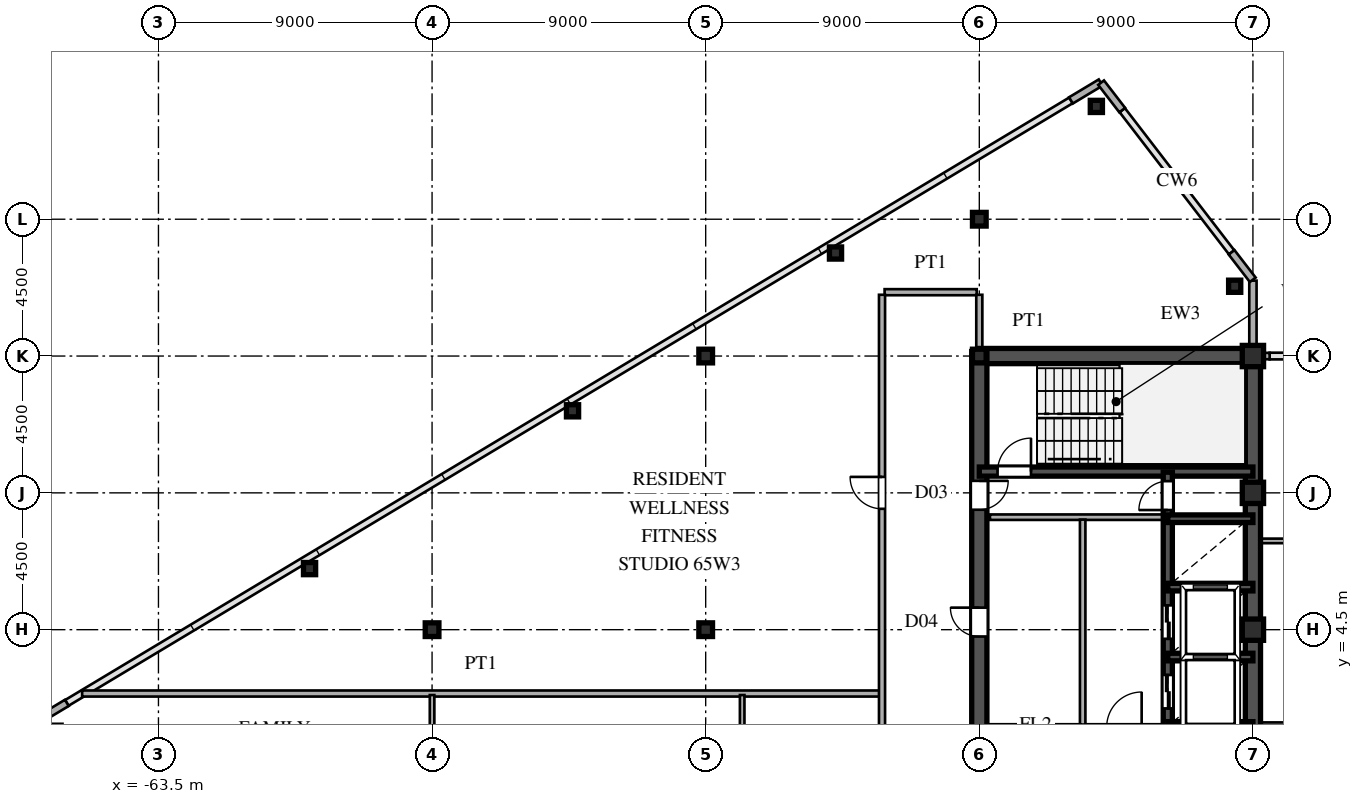
"""IFC4 building model, lengths in metres.
Left out: names, types, materials, properties, quantities, classifications, styles, units other than length and angle.
Written with IfcOpenShell. Run it as: python <this file> out.ifc"""

import sys

from ifc_helpers import new_model, si_unit, direction, frame, frame_2d, origin, origin_2d, place, context, subcontext, project, spatial, rectangle, hollow_rectangle, i_section, extrude, source, transform, mapped, element, fill, save


model = new_model("IFC4")
c1 = context("Model", 3, precision=1e-05, world=origin(), true_north=direction((0.0, 1.0)))
c2 = subcontext(c1, "Body", "Model", "MODEL_VIEW")
j1 = project(units=[si_unit("LENGTHUNIT", "METRE"), si_unit("PLANEANGLEUNIT", "RADIAN")], contexts=[c1])
p1 = place(None, origin())
s1 = spatial("IfcSite", under=j1, at=p1, CompositionType="ELEMENT")
p2 = place(p1, origin())
s2 = spatial("IfcBuilding", under=s1, at=p2, CompositionType="ELEMENT")
p3 = place(p2, frame((0.0, 0.0, 246.9)))
s3 = spatial("IfcBuildingStorey", under=s2, at=p3, CompositionType="ELEMENT", Elevation=246.9)
m1 = source(origin(), c2, "Body", "SweptSolid", [
    extrude(hollow_rectangle(XDim=0.7, YDim=0.7, WallThickness=0.03, at=origin_2d()), origin(), (0.0, 0.0, 1.0), 3.75),
])
for number, where, z_axis, x_axis in (
    (1, (-27.5, 4.5, 0.0), (0.0, 0.0, 1.0), (1.0, 0.0, 0.0)),
    (2, (-27.5, 9.0, 0.0), (0.0, 0.0, 1.0), (1.0, 0.0, 0.0)),
    (3, (-27.5, 13.5, 0.0), (0.0, 0.0, 1.0), (1.0, 0.0, 0.0)),
):
    element("IfcColumn", number, at=place(p3, frame(where, z_axis=z_axis, x_axis=x_axis)), inside=s3, PredefinedType="COLUMN", context=c2, shape_type="MappedRepresentation", body=[
        mapped(m1, transform((0.0, 0.0, 0.0), scale=1.0)),
    ])
m2 = source(origin(), c2, "Body", "SweptSolid", [
    extrude(i_section(OverallWidth=0.45, OverallDepth=0.45, WebThickness=0.016, FlangeThickness=0.025, at=origin_2d()), origin(), (0.0, 0.0, 1.0), 3.75),
])
for number, where, z_axis, x_axis in (
    (4, (-36.5, 13.5, 0.0), (0.0, 0.0, 1.0), (1.0, 0.0, 0.0)),
    (5, (-36.5, 18.0, 0.0), (0.0, 0.0, 1.0), (1.0, 0.0, 0.0)),
    (6, (-45.5, 4.5, 0.0), (0.0, 0.0, 1.0), (1.0, 0.0, 0.0)),
    (7, (-45.5, 13.5, 0.0), (0.0, 0.0, 1.0), (1.0, 0.0, 0.0)),
    (8, (-54.5, 4.5, 0.0), (0.0, 0.0, 1.0), (1.0, 0.0, 0.0)),
):
    element("IfcColumn", number, at=place(p3, frame(where, z_axis=z_axis, x_axis=x_axis)), inside=s3, PredefinedType="COLUMN", context=c2, shape_type="MappedRepresentation", body=[
        mapped(m2, transform((0.0, 0.0, 0.0), scale=1.0)),
    ])
m3 = source(origin(), c2, "Body", "SweptSolid", [
    extrude(hollow_rectangle(XDim=0.4, YDim=0.4, WallThickness=0.016, at=origin_2d()), origin(), (0.0, 0.0, 1.0), 3.75),
])
for number, where, z_axis, x_axis in (
    (9, (-28.1, 15.796, 0.0), (0.0, 0.0, 1.0), (1.0, 0.0, 0.0)),
    (10, (-32.65, 21.71, 0.0), (0.0, 0.0, 1.0), (1.0, 0.0, 0.0)),
    (11, (-41.23, 16.889, 0.0), (0.0, 0.0, 1.0), (1.0, 0.0, 0.0)),
    (12, (-49.88, 11.699, 0.0), (0.0, 0.0, 1.0), (1.0, 0.0, 0.0)),
    (13, (-58.53, 6.509, 0.0), (0.0, 0.0, 1.0), (1.0, 0.0, 0.0)),
):
    element("IfcColumn", number, at=place(p3, frame(where, z_axis=z_axis, x_axis=x_axis)), inside=s3, PredefinedType="COLUMN", context=c2, shape_type="MappedRepresentation", body=[
        mapped(m3, transform((0.0, 0.0, 0.0), scale=1.0)),
    ])
p4 = place(p3, frame((-27.5, 13.755, 0.0), z_axis=(0.0, 0.0, 1.0), x_axis=(0.0, 1.0, 0.0)))
e14 = element("IfcWall", 14, at=p4, inside=s3, PredefinedType="SOLIDWALL", context=c2, shape_type="SweptSolid", body=[
    extrude(rectangle(XDim=0.62, YDim=0.24, at=frame_2d((0.31, 0.0))), origin(), (0.0, 0.0, 1.0), 3.03),
])
p5 = place(p3, frame((-27.5, 14.375, 0.0), z_axis=(0.0, 0.0, 1.0), x_axis=(0.0, 1.0, 0.0)))
e15 = element("IfcWall", 15, at=p5, inside=s3, PredefinedType="SOLIDWALL", context=c2, shape_type="SweptSolid", body=[
    extrude(rectangle(XDim=1.605, YDim=0.24, at=frame_2d((0.803, 0.0))), origin(), (0.0, 0.0, 1.0), 3.53),
])
for number, where, z_axis, x_axis in (
    (16, (-27.506, 16.008, 0.0), (0.0, 0.0, 1.0), (-0.61, 0.793, 0.0)),
    (17, (-31.799, 21.588, 0.0), (0.0, 0.0, 1.0), (-0.61, 0.793, 0.0)),
    (18, (-32.509, 22.495, 0.0), (0.0, 0.0, 1.0), (-0.857, -0.515, 0.0)),
    (19, (-66.514, 2.092, 0.0), (0.0, 0.0, 1.0), (-0.857, -0.515, 0.0)),
):
    element("IfcWall", number, at=place(p3, frame(where, z_axis=z_axis, x_axis=x_axis)), inside=s3, PredefinedType="SOLIDWALL", context=c2, shape_type="SweptSolid", body=[
        extrude(rectangle(XDim=1.14, YDim=0.24, at=frame_2d((0.57, 0.0))), origin(), (0.0, 0.0, 1.0), 3.53),
    ])
p6 = place(p3, frame((-27.49, 13.5, 0.0), z_axis=(0.0, 0.0, 1.0), x_axis=(1.0, 0.0, 0.0)))
e20 = element("IfcWall", 20, at=p6, inside=s3, PredefinedType="SOLIDWALL", context=c2, shape_type="SweptSolid", body=[
    extrude(rectangle(XDim=0.54, YDim=0.21, at=frame_2d((0.27, 0.0))), origin(), (0.0, 0.0, 1.0), 3.03),
])
p7 = place(p3, frame((-27.5, 1.3, 0.0), z_axis=(0.0, 0.0, 1.0), x_axis=(0.0, 1.0, 0.0)))
e21 = element("IfcWall", 21, at=p7, inside=s3, PredefinedType="SHEAR", context=c2, shape_type="SweptSolid", body=[
    extrude(rectangle(XDim=12.2, YDim=0.5, at=frame_2d((6.1, 0.0))), origin(), (0.0, 0.0, 1.0), 3.53),
])
p8 = place(p3, frame((-36.5, 13.5, 0.0), z_axis=(0.0, 0.0, 1.0), x_axis=(1.0, 0.0, 0.0)))
e22 = element("IfcWall", 22, at=p8, inside=s3, PredefinedType="SHEAR", context=c2, shape_type="SweptSolid", body=[
    extrude(rectangle(XDim=9.0, YDim=0.5, at=frame_2d((4.5, 0.0))), origin(), (0.0, 0.0, 1.0), 3.53),
])
p9 = place(p3, frame((-36.5, 8.2, 0.0), z_axis=(0.0, 0.0, 1.0), x_axis=(0.0, 1.0, 0.0)))
e23 = element("IfcWall", 23, at=p9, inside=s3, PredefinedType="SHEAR", context=c2, shape_type="SweptSolid", body=[
    extrude(rectangle(XDim=5.45, YDim=0.5, at=frame_2d((2.725, 0.0))), origin(), (0.0, 0.0, 1.0), 3.53),
])
p10 = place(p9, frame((0.245, 0.0, 0.0)))
e24 = element("IfcOpeningElement", 24, at=p10, cuts=e23, PredefinedType="OPENING", context=c2, shape_type="SweptSolid", body=[
    extrude(rectangle(XDim=0.95, YDim=2.15, at=frame_2d((0.475, 1.075))), frame((0.0, 0.26, 0.0), z_axis=(0.0, -1.0, 0.0), x_axis=(1.0, 0.0, 0.0)), (0.0, 0.0, 1.0), 0.52),
])
p11 = place(p3, frame((-36.5, 1.3, 0.0), z_axis=(0.0, 0.0, 1.0), x_axis=(0.0, 1.0, 0.0)))
e25 = element("IfcWall", 25, at=p11, inside=s3, PredefinedType="SHEAR", context=c2, shape_type="SweptSolid", body=[
    extrude(rectangle(XDim=6.9, YDim=0.5, at=frame_2d((3.45, 0.0))), origin(), (0.0, 0.0, 1.0), 3.53),
])
p12 = place(p11, frame((2.975, 0.0, 0.0)))
e26 = element("IfcOpeningElement", 26, at=p12, cuts=e25, PredefinedType="OPENING", context=c2, shape_type="SweptSolid", body=[
    extrude(rectangle(XDim=0.95, YDim=2.15, at=frame_2d((0.475, 1.075))), frame((0.0, 0.26, 0.0), z_axis=(0.0, -1.0, 0.0), x_axis=(1.0, 0.0, 0.0)), (0.0, 0.0, 1.0), 0.52),
])
p13 = place(p3, frame((-36.5, 9.7, 0.0), z_axis=(0.0, 0.0, 1.0), x_axis=(1.0, 0.0, 0.0)))
e27 = element("IfcWall", 27, at=p13, inside=s3, PredefinedType="SHEAR", context=c2, shape_type="SweptSolid", body=[
    extrude(rectangle(XDim=9.0, YDim=0.3, at=frame_2d((4.5, 0.0))), origin(), (0.0, 0.0, 1.0), 3.53),
])
p14 = place(p13, frame((0.6, 0.0, 0.0)))
e28 = element("IfcOpeningElement", 28, at=p14, cuts=e27, PredefinedType="OPENING", context=c2, shape_type="SweptSolid", body=[
    extrude(rectangle(XDim=1.1, YDim=2.2, at=frame_2d((0.55, 1.1))), frame((0.0, 0.16, 0.0), z_axis=(0.0, -1.0, 0.0), x_axis=(1.0, 0.0, 0.0)), (0.0, 0.0, 1.0), 0.32),
])
for number, where, z_axis, x_axis in (
    (29, (-30.3, 1.35, 0.0), (0.0, 0.0, 1.0), (1.0, 0.0, 0.0)),
    (30, (-30.3, 3.6, 0.0), (0.0, 0.0, 1.0), (1.0, 0.0, 0.0)),
    (31, (-30.3, 5.9, 0.0), (0.0, 0.0, 1.0), (1.0, 0.0, 0.0)),
    (32, (-30.3, 8.15, 0.0), (0.0, 0.0, 1.0), (1.0, 0.0, 0.0)),
):
    element("IfcWall", number, at=place(p3, frame(where, z_axis=z_axis, x_axis=x_axis)), inside=s3, PredefinedType="SHEAR", context=c2, shape_type="SweptSolid", body=[
        extrude(rectangle(XDim=2.8, YDim=0.25, at=frame_2d((1.4, 0.0))), origin(), (0.0, 0.0, 1.0), 3.53),
    ])
p15 = place(p3, frame((-30.3, 1.32, 0.0), z_axis=(0.0, 0.0, 1.0), x_axis=(0.0, 1.0, 0.0)))
e33 = element("IfcWall", 33, at=p15, inside=s3, PredefinedType="SHEAR", context=c2, shape_type="SweptSolid", body=[
    extrude(rectangle(XDim=2.28, YDim=0.3, at=frame_2d((1.14, 0.0))), origin(), (0.0, 0.0, 1.0), 3.53),
])
p16 = place(p15, frame((0.59, 0.0, 0.0)))
e34 = element("IfcOpeningElement", 34, at=p16, cuts=e33, PredefinedType="OPENING", context=c2, shape_type="SweptSolid", body=[
    extrude(rectangle(XDim=1.1, YDim=2.2, at=frame_2d((0.55, 1.1))), frame((0.0, 0.16, 0.0), z_axis=(0.0, -1.0, 0.0), x_axis=(1.0, 0.0, 0.0)), (0.0, 0.0, 1.0), 0.32),
])
p17 = place(p3, frame((-30.3, 3.6, 0.0), z_axis=(0.0, 0.0, 1.0), x_axis=(0.0, 1.0, 0.0)))
e35 = element("IfcWall", 35, at=p17, inside=s3, PredefinedType="SHEAR", context=c2, shape_type="SweptSolid", body=[
    extrude(rectangle(XDim=2.3, YDim=0.3, at=frame_2d((1.15, 0.0))), origin(), (0.0, 0.0, 1.0), 3.53),
])
p18 = place(p17, frame((0.6, 0.0, 0.0)))
e36 = element("IfcOpeningElement", 36, at=p18, cuts=e35, PredefinedType="OPENING", context=c2, shape_type="SweptSolid", body=[
    extrude(rectangle(XDim=1.1, YDim=2.2, at=frame_2d((0.55, 1.1))), frame((0.0, 0.16, 0.0), z_axis=(0.0, -1.0, 0.0), x_axis=(1.0, 0.0, 0.0)), (0.0, 0.0, 1.0), 0.32),
])
p19 = place(p3, frame((-30.3, 5.9, 0.0), z_axis=(0.0, 0.0, 1.0), x_axis=(0.0, 1.0, 0.0)))
e37 = element("IfcWall", 37, at=p19, inside=s3, PredefinedType="SHEAR", context=c2, shape_type="SweptSolid", body=[
    extrude(rectangle(XDim=2.25, YDim=0.3, at=frame_2d((1.125, 0.0))), origin(), (0.0, 0.0, 1.0), 3.53),
])
p20 = place(p3, frame((-30.3, 8.15, 0.0), z_axis=(0.0, 0.0, 1.0), x_axis=(0.0, 1.0, 0.0)))
e38 = element("IfcWall", 38, at=p20, inside=s3, PredefinedType="SHEAR", context=c2, shape_type="SweptSolid", body=[
    extrude(rectangle(XDim=1.53, YDim=0.3, at=frame_2d((0.765, 0.0))), origin(), (0.0, 0.0, 1.0), 3.53),
])
p21 = place(p20, frame((0.285, 0.0, 0.0)))
e39 = element("IfcOpeningElement", 39, at=p21, cuts=e38, PredefinedType="OPENING", context=c2, shape_type="SweptSolid", body=[
    extrude(rectangle(XDim=0.95, YDim=2.15, at=frame_2d((0.475, 1.075))), frame((0.0, 0.16, 0.0), z_axis=(0.0, -1.0, 0.0), x_axis=(1.0, 0.0, 0.0)), (0.0, 0.0, 1.0), 0.32),
])
p22 = place(p3, frame((-36.15, 8.2, 0.0), z_axis=(0.0, 0.0, 1.0), x_axis=(1.0, 0.0, 0.0)))
e40 = element("IfcWall", 40, at=p22, inside=s3, PredefinedType="PARTITIONING", context=c2, shape_type="SweptSolid", body=[
    extrude(rectangle(XDim=5.7, YDim=0.18, at=frame_2d((2.85, 0.0))), origin(), (0.0, 0.0, 1.0), 3.53),
])
p23 = place(p3, frame((-33.1, 1.38, 0.0), z_axis=(0.0, 0.0, 1.0), x_axis=(0.0, 1.0, 0.0)))
e41 = element("IfcWall", 41, at=p23, inside=s3, PredefinedType="PARTITIONING", context=c2, shape_type="SweptSolid", body=[
    extrude(rectangle(XDim=6.74, YDim=0.18, at=frame_2d((3.37, 0.0))), origin(), (0.0, 0.0, 1.0), 3.53),
])
p24 = place(p3, frame((-27.245, 1.35, 0.0), z_axis=(0.0, 0.0, 1.0), x_axis=(1.0, 0.0, 0.0)))
e42 = element("IfcWall", 42, at=p24, inside=s3, PredefinedType="PARTITIONING", context=c2, shape_type="SweptSolid", body=[
    extrude(rectangle(XDim=54.49, YDim=0.2, at=frame_2d((27.245, 0.0))), origin(), (0.0, 0.0, 1.0), 3.53),
])
p25 = place(p24, frame((24.97, 0.0, 0.0)))
e43 = element("IfcOpeningElement", 43, at=p25, cuts=e42, PredefinedType="OPENING", context=c2, shape_type="SweptSolid", body=[
    extrude(rectangle(XDim=1.05, YDim=2.25, at=frame_2d((0.525, 1.125))), frame((0.0, 0.11, 0.0), z_axis=(0.0, -1.0, 0.0), x_axis=(1.0, 0.0, 0.0)), (0.0, 0.0, 1.0), 0.22),
])
p26 = place(p3, frame((-66.01, 2.4, 0.0), z_axis=(0.0, 0.0, 1.0), x_axis=(1.0, 0.0, 0.0)))
e44 = element("IfcWall", 44, at=p26, inside=s3, PredefinedType="PARTITIONING", context=c2, shape_type="SweptSolid", body=[
    extrude(rectangle(XDim=26.23, YDim=0.2, at=frame_2d((13.115, 0.0))), origin(), (0.0, 0.0, 1.0), 3.53),
])
p27 = place(p3, frame((-27.245, 7.42, 0.0), z_axis=(0.0, 0.0, 1.0), x_axis=(1.0, 0.0, 0.0)))
e45 = element("IfcWall", 45, at=p27, inside=s3, PredefinedType="PARTITIONING", context=c2, shape_type="SweptSolid", body=[
    extrude(rectangle(XDim=7.66, YDim=0.15, at=frame_2d((3.83, 0.0))), origin(), (0.0, 0.0, 1.0), 3.53),
])
p28 = place(p27, frame((3.57, 0.0, 0.0)))
e46 = element("IfcOpeningElement", 46, at=p28, cuts=e45, PredefinedType="OPENING", context=c2, shape_type="SweptSolid", body=[
    extrude(rectangle(XDim=0.95, YDim=2.15, at=frame_2d((0.475, 1.075))), frame((0.0, 0.085, 0.0), z_axis=(0.0, -1.0, 0.0), x_axis=(1.0, 0.0, 0.0)), (0.0, 0.0, 1.0), 0.17),
])
p29 = place(p3, frame((-39.615, 15.6, 0.0), z_axis=(0.0, 0.0, 1.0), x_axis=(1.0, 0.0, 0.0)))
e47 = element("IfcWall", 47, at=p29, inside=s3, PredefinedType="PARTITIONING", context=c2, shape_type="SweptSolid", body=[
    extrude(rectangle(XDim=3.03, YDim=0.2, at=frame_2d((1.515, 0.0))), origin(), (0.0, 0.0, 1.0), 3.53),
])
p30 = place(p3, frame((-54.5, -9.335, 0.0), z_axis=(0.0, 0.0, 1.0), x_axis=(0.0, 1.0, 0.0)))
e48 = element("IfcWall", 48, at=p30, inside=s3, PredefinedType="PARTITIONING", context=c2, shape_type="SweptSolid", body=[
    extrude(rectangle(XDim=11.685, YDim=0.15, at=frame_2d((5.843, 0.0))), origin(), (0.0, 0.0, 1.0), 2.93),
])
p31 = place(p30, frame((5.107, 0.0, 0.0)))
e49 = element("IfcOpeningElement", 49, at=p31, cuts=e48, PredefinedType="OPENING", context=c2, shape_type="SweptSolid", body=[
    extrude(rectangle(XDim=0.95, YDim=2.15, at=frame_2d((0.475, 1.075))), frame((0.0, 0.085, 0.0), z_axis=(0.0, -1.0, 0.0), x_axis=(1.0, 0.0, 0.0)), (0.0, 0.0, 1.0), 0.17),
])
p32 = place(p30, frame((1.21, 0.0, 0.0)))
e50 = element("IfcOpeningElement", 50, at=p32, cuts=e48, PredefinedType="OPENING", context=c2, shape_type="SweptSolid", body=[
    extrude(rectangle(XDim=0.95, YDim=2.15, at=frame_2d((0.475, 1.075))), frame((0.0, 0.085, 0.0), z_axis=(0.0, -1.0, 0.0), x_axis=(1.0, 0.0, 0.0)), (0.0, 0.0, 1.0), 0.17),
])
p33 = place(p30, frame((9.16, 0.0, 0.0)))
e51 = element("IfcOpeningElement", 51, at=p33, cuts=e48, PredefinedType="OPENING", context=c2, shape_type="SweptSolid", body=[
    extrude(rectangle(XDim=0.95, YDim=2.15, at=frame_2d((0.475, 1.075))), frame((0.0, 0.085, 0.0), z_axis=(0.0, -1.0, 0.0), x_axis=(1.0, 0.0, 0.0)), (0.0, 0.0, 1.0), 0.17),
])
p34 = place(p3, frame((-44.3, -1.328, 0.0), z_axis=(0.0, 0.0, 1.0), x_axis=(0.0, 1.0, 0.0)))
e52 = element("IfcWall", 52, at=p34, inside=s3, PredefinedType="PARTITIONING", context=c2, shape_type="SweptSolid", body=[
    extrude(rectangle(XDim=3.678, YDim=0.15, at=frame_2d((1.839, 0.0))), origin(), (0.0, 0.0, 1.0), 3.53),
])
p35 = place(p3, frame((-39.7, -15.515, 0.0), z_axis=(0.0, 0.0, 1.0), x_axis=(0.0, 1.0, 0.0)))
e53 = element("IfcWall", 53, at=p35, inside=s3, PredefinedType="PARTITIONING", context=c2, shape_type="SweptSolid", body=[
    extrude(rectangle(XDim=31.03, YDim=0.2, at=frame_2d((15.515, 0.0))), origin(), (0.0, 0.0, 1.0), 3.53),
])
p36 = place(p35, frame((2.09, 0.0, 0.0)))
e54 = element("IfcOpeningElement", 54, at=p36, cuts=e53, PredefinedType="OPENING", context=c2, shape_type="SweptSolid", body=[
    extrude(rectangle(XDim=1.05, YDim=2.25, at=frame_2d((0.525, 1.125))), frame((0.0, 0.11, 0.0), z_axis=(0.0, -1.0, 0.0), x_axis=(1.0, 0.0, 0.0)), (0.0, 0.0, 1.0), 0.22),
])
p37 = place(p35, frame((10.901, 0.0, 0.0)))
e55 = element("IfcOpeningElement", 55, at=p37, cuts=e53, PredefinedType="OPENING", context=c2, shape_type="SweptSolid", body=[
    extrude(rectangle(XDim=1.05, YDim=2.25, at=frame_2d((0.525, 1.125))), frame((0.0, 0.11, 0.0), z_axis=(0.0, -1.0, 0.0), x_axis=(1.0, 0.0, 0.0)), (0.0, 0.0, 1.0), 0.22),
])
p38 = place(p35, frame((23.99, 0.0, 0.0)))
e56 = element("IfcOpeningElement", 56, at=p38, cuts=e53, PredefinedType="OPENING", context=c2, shape_type="SweptSolid", body=[
    extrude(rectangle(XDim=1.05, YDim=2.25, at=frame_2d((0.525, 1.125))), frame((0.0, 0.11, 0.0), z_axis=(0.0, -1.0, 0.0), x_axis=(1.0, 0.0, 0.0)), (0.0, 0.0, 1.0), 0.22),
])
p39 = place(p3, frame((-36.5, 13.755, 0.0), z_axis=(0.0, 0.0, 1.0), x_axis=(0.0, 1.0, 0.0)))
e57 = element("IfcWall", 57, at=p39, inside=s3, PredefinedType="PARTITIONING", context=c2, shape_type="SweptSolid", body=[
    extrude(rectangle(XDim=1.76, YDim=0.2, at=frame_2d((0.88, 0.0))), origin(), (0.0, 0.0, 1.0), 2.93),
])
m4 = source(origin(), c2, "Body", "SweptSolid", [
    extrude(rectangle(XDim=0.95, YDim=2.15, at=frame_2d((0.475, 1.075))), frame((0.0, 0.025, 0.0), z_axis=(0.0, -1.0, 0.0), x_axis=(1.0, 0.0, 0.0)), (0.0, 0.0, 1.0), 0.05),
])
p40 = place(p10, frame((0.95, 0.0, 0.0), z_axis=(0.0, 0.0, 1.0), x_axis=(-1.0, 0.0, 0.0)))
e58 = element("IfcDoor", 58, at=p40, inside=s3, OperationType="SINGLE_SWING_RIGHT", PredefinedType="DOOR", context=c2, shape_type="MappedRepresentation", body=[
    mapped(m4, transform((0.0, 0.0, 0.0), scale=1.0)),
])
fill(e24, e58)
p41 = place(p12, origin())
e59 = element("IfcDoor", 59, at=p41, inside=s3, OperationType="SINGLE_SWING_RIGHT", PredefinedType="DOOR", context=c2, shape_type="MappedRepresentation", body=[
    mapped(m4, transform((0.0, 0.0, 0.0), scale=1.0)),
])
fill(e26, e59)
m5 = source(origin(), c2, "Body", "SweptSolid", [
    extrude(rectangle(XDim=1.1, YDim=2.2, at=frame_2d((0.55, 1.1))), frame((0.0, 0.025, 0.0), z_axis=(0.0, -1.0, 0.0), x_axis=(1.0, 0.0, 0.0)), (0.0, 0.0, 1.0), 0.05),
])
p42 = place(p14, origin())
e60 = element("IfcDoor", 60, at=p42, inside=s3, OperationType="SINGLE_SWING_RIGHT", PredefinedType="DOOR", context=c2, shape_type="MappedRepresentation", body=[
    mapped(m5, transform((0.0, 0.0, 0.0), scale=1.0)),
])
fill(e28, e60)
m6 = source(origin(), c2, "Body", "SweptSolid", [
    extrude(rectangle(XDim=1.1, YDim=2.2, at=frame_2d((0.55, 1.1))), frame((0.0, 0.025, 0.0), z_axis=(0.0, -1.0, 0.0), x_axis=(1.0, 0.0, 0.0)), (0.0, 0.0, 1.0), 0.05),
])
p43 = place(p16, origin())
e61 = element("IfcDoor", 61, at=p43, inside=s3, OperationType="DOUBLE_DOOR_SLIDING", PredefinedType="DOOR", context=c2, shape_type="MappedRepresentation", body=[
    mapped(m6, transform((0.0, 0.0, 0.0), scale=1.0)),
])
fill(e34, e61)
p44 = place(p18, origin())
e62 = element("IfcDoor", 62, at=p44, inside=s3, OperationType="DOUBLE_DOOR_SLIDING", PredefinedType="DOOR", context=c2, shape_type="MappedRepresentation", body=[
    mapped(m6, transform((0.0, 0.0, 0.0), scale=1.0)),
])
fill(e36, e62)
p45 = place(p21, origin())
e63 = element("IfcDoor", 63, at=p45, inside=s3, OperationType="SINGLE_SWING_LEFT", PredefinedType="DOOR", context=c2, shape_type="MappedRepresentation", body=[
    mapped(m4, transform((0.0, 0.0, 0.0), scale=1.0)),
])
fill(e39, e63)
m7 = source(origin(), c2, "Body", "SweptSolid", [
    extrude(rectangle(XDim=1.05, YDim=2.25, at=frame_2d((0.525, 1.125))), frame((0.0, 0.025, 0.0), z_axis=(0.0, -1.0, 0.0), x_axis=(1.0, 0.0, 0.0)), (0.0, 0.0, 1.0), 0.05),
])
p46 = place(p38, origin())
e64 = element("IfcDoor", 64, at=p46, inside=s3, OperationType="SINGLE_SWING_RIGHT", PredefinedType="DOOR", context=c2, shape_type="MappedRepresentation", body=[
    mapped(m7, transform((0.0, 0.0, 0.0), scale=1.0)),
])
fill(e56, e64)
save(model, sys.argv[1])
